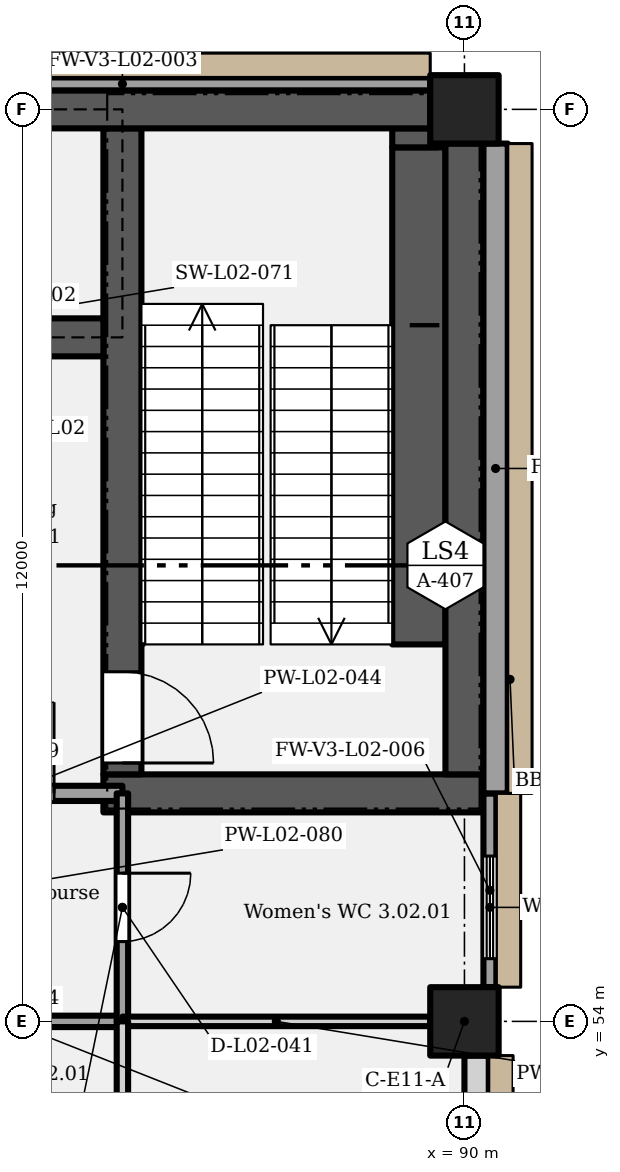
"""IFC4 building model, lengths in metres.
Left out: names, types, materials, properties, quantities, classifications, styles, units other than length and angle.
Written with IfcOpenShell. Run it as: python <this file> out.ifc"""

import sys

from ifc_helpers import new_model, si_unit, direction, frame, frame_2d, origin, origin_2d, place, context, subcontext, project, spatial, rectangle, extrude, element, fill, save


model = new_model("IFC4")
c1 = context("Model", 3, precision=1e-05, world=origin(), true_north=direction((0.0, 1.0)))
c2 = subcontext(c1, "Body", "Model", "MODEL_VIEW")
j1 = project(units=[si_unit("LENGTHUNIT", "METRE"), si_unit("PLANEANGLEUNIT", "RADIAN")], contexts=[c1])
p1 = place(None, origin())
s1 = spatial("IfcSite", under=j1, at=p1, CompositionType="ELEMENT")
p2 = place(p1, origin())
s2 = spatial("IfcBuilding", under=s1, at=p2, CompositionType="ELEMENT")
p3 = place(p2, frame((0.0, 0.0, 12.0)))
s3 = spatial("IfcBuildingStorey", under=s2, at=p3, CompositionType="ELEMENT", Elevation=12.0)
for number, where, z_axis, x_axis in (
    (1, (90.0, 54.0, 0.0), (0.0, 0.0, 1.0), (1.0, 0.0, 0.0)),
    (2, (90.0, 66.0, 0.0), (0.0, 0.0, 1.0), (1.0, 0.0, 0.0)),
):
    element("IfcColumn", number, at=place(p3, frame(where, z_axis=z_axis, x_axis=x_axis)), inside=s3, PredefinedType="COLUMN", context=c2, shape_type="SweptSolid", body=[
        extrude(rectangle(XDim=0.9, YDim=0.9, at=origin_2d()), origin(), (0.0, 0.0, 1.0), 5.4),
    ])
p4 = place(p3, frame((85.25, 57.0, 0.0), z_axis=(0.0, 0.0, 1.0), x_axis=(1.0, 0.0, 0.0)))
e3 = element("IfcWall", 3, at=p4, inside=s3, PredefinedType="SHEAR", context=c2, shape_type="SweptSolid", body=[
    extrude(rectangle(XDim=5.0, YDim=0.5, at=frame_2d((2.5, 0.0))), origin(), (0.0, 0.0, 1.0), 5.15),
])
p5 = place(p3, frame((85.5, 57.25, 0.0), z_axis=(0.0, 0.0, 1.0), x_axis=(0.0, 1.0, 0.0)))
e4 = element("IfcWall", 4, at=p5, inside=s3, PredefinedType="SHEAR", context=c2, shape_type="SweptSolid", body=[
    extrude(rectangle(XDim=8.5, YDim=0.5, at=frame_2d((4.25, 0.0))), origin(), (0.0, 0.0, 1.0), 5.15),
])
p6 = place(p5, frame((1.35, 0.0, 0.0), z_axis=(0.0, 0.0, 1.0), x_axis=(-1.0, 0.0, 0.0)))
e5 = element("IfcOpeningElement", 5, at=p6, cuts=e4, PredefinedType="OPENING", context=c2, shape_type="SweptSolid", body=[
    extrude(rectangle(XDim=1.2, YDim=2.1, at=frame_2d((0.6, 1.05))), frame((0.0, 0.26, 0.0), z_axis=(0.0, -1.0, 0.0), x_axis=(1.0, 0.0, 0.0)), (0.0, 0.0, 1.0), 0.52),
])
p7 = place(p3, frame((90.0, 57.25, 0.0), z_axis=(0.0, 0.0, 1.0), x_axis=(0.0, 1.0, 0.0)))
e6 = element("IfcWall", 6, at=p7, inside=s3, PredefinedType="SHEAR", context=c2, shape_type="SweptSolid", body=[
    extrude(rectangle(XDim=8.3, YDim=0.5, at=frame_2d((4.15, 0.0))), origin(), (0.0, 0.0, 1.0), 5.15),
])
p8 = place(p3, frame((79.25, 63.0, 0.0), z_axis=(0.0, 0.0, 1.0), x_axis=(1.0, 0.0, 0.0)))
e7 = element("IfcWall", 7, at=p8, inside=s3, PredefinedType="SHEAR", context=c2, shape_type="SweptSolid", body=[
    extrude(rectangle(XDim=6.0, YDim=0.5, at=frame_2d((3.0, 0.0))), origin(), (0.0, 0.0, 1.0), 5.15),
])
p9 = place(p8, frame((4.2, 0.0, 0.0)))
e8 = element("IfcOpeningElement", 8, at=p9, cuts=e7, PredefinedType="OPENING", context=c2, shape_type="SweptSolid", body=[
    extrude(rectangle(XDim=1.1, YDim=2.1, at=frame_2d((0.55, 1.05))), frame((0.0, 0.26, 0.0), z_axis=(0.0, -1.0, 0.0), x_axis=(1.0, 0.0, 0.0)), (0.0, 0.0, 1.0), 0.52),
])
p10 = place(p3, frame((82.25, 66.0, 0.0), z_axis=(0.0, 0.0, 1.0), x_axis=(1.0, 0.0, 0.0)))
e9 = element("IfcWall", 9, at=p10, inside=s3, PredefinedType="SHEAR", context=c2, shape_type="SweptSolid", body=[
    extrude(rectangle(XDim=7.3, YDim=0.5, at=frame_2d((3.65, 0.0))), origin(), (0.0, 0.0, 1.0), 5.15),
])
p11 = place(p3, frame((81.45, 66.335, 0.0), z_axis=(0.0, 0.0, 1.0), x_axis=(1.0, 0.0, 0.0)))
e10 = element("IfcWall", 10, at=p11, inside=s3, PredefinedType="SOLIDWALL", context=c2, shape_type="SweptSolid", body=[
    extrude(rectangle(XDim=8.1, YDim=0.17, at=frame_2d((4.05, 0.0))), origin(), (0.0, 0.0, 1.0), 5.15),
])
p12 = place(p3, frame((90.16, 49.5, 0.0), z_axis=(0.0, 0.0, 1.0), x_axis=(0.0, 1.0, 0.0)))
e11 = element("IfcWall", 11, at=p12, inside=s3, PredefinedType="SOLIDWALL", context=c2, shape_type="SweptSolid", body=[
    extrude(rectangle(XDim=4.05, YDim=0.32, at=frame_2d((2.025, 0.0))), origin(), (0.0, 0.0, 1.0), 5.15),
])
p13 = place(p12, frame((2.25, 0.0, 1.2)))
e12 = element("IfcOpeningElement", 12, at=p13, cuts=e11, PredefinedType="OPENING", context=c2, shape_type="SweptSolid", body=[
    extrude(rectangle(XDim=1.2, YDim=2.1, at=frame_2d((0.6, 1.05))), frame((0.0, 0.17, 0.0), z_axis=(0.0, -1.0, 0.0), x_axis=(1.0, 0.0, 0.0)), (0.0, 0.0, 1.0), 0.34),
])
p14 = place(p3, frame((90.335, 54.45, 0.0), z_axis=(0.0, 0.0, 1.0), x_axis=(0.0, 1.0, 0.0)))
e13 = element("IfcWall", 13, at=p14, inside=s3, PredefinedType="SOLIDWALL", context=c2, shape_type="SweptSolid", body=[
    extrude(rectangle(XDim=2.55, YDim=0.17, at=frame_2d((1.275, 0.0))), origin(), (0.0, 0.0, 1.0), 5.15),
])
p15 = place(p14, frame((0.375, 0.0, 1.2)))
e14 = element("IfcOpeningElement", 14, at=p15, cuts=e13, PredefinedType="OPENING", context=c2, shape_type="SweptSolid", body=[
    extrude(rectangle(XDim=1.35, YDim=2.55, at=frame_2d((0.675, 1.275))), frame((0.0, 0.095, 0.0), z_axis=(0.0, -1.0, 0.0), x_axis=(1.0, 0.0, 0.0)), (0.0, 0.0, 1.0), 0.19),
])
p16 = place(p3, frame((90.41, 57.0, 0.0), z_axis=(0.0, 0.0, 1.0), x_axis=(0.0, 1.0, 0.0)))
e15 = element("IfcWall", 15, at=p16, inside=s3, PredefinedType="SOLIDWALL", context=c2, shape_type="SweptSolid", body=[
    extrude(rectangle(XDim=8.55, YDim=0.32, at=frame_2d((4.275, 0.0))), origin(), (0.0, 0.0, 1.0), 5.15),
])
p17 = place(p3, frame((82.5, 54.0, 0.0), z_axis=(0.0, 0.0, 1.0), x_axis=(1.0, 0.0, 0.0)))
e16 = element("IfcWall", 16, at=p17, inside=s3, PredefinedType="PARTITIONING", context=c2, shape_type="SweptSolid", body=[
    extrude(rectangle(XDim=3.0, YDim=0.15, at=frame_2d((1.5, 0.0))), origin(), (0.0, 0.0, 1.0), 4.4),
])
p18 = place(p17, frame((2.0, 0.0, 0.0), z_axis=(0.0, 0.0, 1.0), x_axis=(-1.0, 0.0, 0.0)))
e17 = element("IfcOpeningElement", 17, at=p18, cuts=e16, PredefinedType="OPENING", context=c2, shape_type="SweptSolid", body=[
    extrude(rectangle(XDim=1.0, YDim=2.1, at=frame_2d((0.5, 1.05))), frame((0.0, 0.085, 0.0), z_axis=(0.0, -1.0, 0.0), x_axis=(1.0, 0.0, 0.0)), (0.0, 0.0, 1.0), 0.17),
])
p19 = place(p3, frame((85.5, 54.0, 0.0), z_axis=(0.0, 0.0, 1.0), x_axis=(1.0, 0.0, 0.0)))
e18 = element("IfcWall", 18, at=p19, inside=s3, PredefinedType="PARTITIONING", context=c2, shape_type="SweptSolid", body=[
    extrude(rectangle(XDim=4.05, YDim=0.125, at=frame_2d((2.025, 0.0))), origin(), (0.0, 0.0, 1.0), 4.4),
])
p20 = place(p3, frame((82.5, 57.0, 0.0), z_axis=(0.0, 0.0, 1.0), x_axis=(1.0, 0.0, 0.0)))
e19 = element("IfcWall", 19, at=p20, inside=s3, PredefinedType="PARTITIONING", context=c2, shape_type="SweptSolid", body=[
    extrude(rectangle(XDim=3.0, YDim=0.2, at=frame_2d((1.5, 0.0))), origin(), (0.0, 0.0, 1.0), 5.15),
])
p21 = place(p20, frame((0.9, 0.0, 0.0)))
e20 = element("IfcOpeningElement", 20, at=p21, cuts=e19, PredefinedType="OPENING", context=c2, shape_type="SweptSolid", body=[
    extrude(rectangle(XDim=1.2, YDim=2.1, at=frame_2d((0.6, 1.05))), frame((0.0, 0.11, 0.0), z_axis=(0.0, -1.0, 0.0), x_axis=(1.0, 0.0, 0.0)), (0.0, 0.0, 1.0), 0.22),
])
p22 = place(p3, frame((85.5, 49.575, 0.0), z_axis=(0.0, 0.0, 1.0), x_axis=(0.0, 1.0, 0.0)))
e21 = element("IfcWall", 21, at=p22, inside=s3, PredefinedType="PARTITIONING", context=c2, shape_type="SweptSolid", body=[
    extrude(rectangle(XDim=4.425, YDim=0.15, at=frame_2d((2.212, 0.0))), origin(), (0.0, 0.0, 1.0), 5.15),
])
p23 = place(p22, frame((2.625, 0.0, 0.0), z_axis=(0.0, 0.0, 1.0), x_axis=(-1.0, 0.0, 0.0)))
e22 = element("IfcOpeningElement", 22, at=p23, cuts=e21, PredefinedType="OPENING", context=c2, shape_type="SweptSolid", body=[
    extrude(rectangle(XDim=0.9, YDim=2.1, at=frame_2d((0.45, 1.05))), frame((0.0, 0.085, 0.0), z_axis=(0.0, -1.0, 0.0), x_axis=(1.0, 0.0, 0.0)), (0.0, 0.0, 1.0), 0.17),
])
p24 = place(p3, frame((85.5, 54.0, 0.0), z_axis=(0.0, 0.0, 1.0), x_axis=(0.0, 1.0, 0.0)))
e23 = element("IfcWall", 23, at=p24, inside=s3, PredefinedType="PARTITIONING", context=c2, shape_type="SweptSolid", body=[
    extrude(rectangle(XDim=3.0, YDim=0.15, at=frame_2d((1.5, 0.0))), origin(), (0.0, 0.0, 1.0), 5.15),
])
p25 = place(p24, frame((1.95, 0.0, 0.0), z_axis=(0.0, 0.0, 1.0), x_axis=(-1.0, 0.0, 0.0)))
e24 = element("IfcOpeningElement", 24, at=p25, cuts=e23, PredefinedType="OPENING", context=c2, shape_type="SweptSolid", body=[
    extrude(rectangle(XDim=0.9, YDim=2.1, at=frame_2d((0.45, 1.05))), frame((0.0, 0.085, 0.0), z_axis=(0.0, -1.0, 0.0), x_axis=(1.0, 0.0, 0.0)), (0.0, 0.0, 1.0), 0.17),
])
p26 = place(p3, frame((89.4, 58.96, 0.0), z_axis=(0.0, 0.0, 1.0), x_axis=(0.0, 1.0, 0.0)))
e25 = element("IfcWall", 25, at=p26, inside=s3, PredefinedType="SHEAR", context=c2, shape_type="SweptSolid", body=[
    extrude(rectangle(XDim=6.54, YDim=0.7, at=frame_2d((3.27, 0.0))), origin(), (0.0, 0.0, 1.0), 2.587),
])
p27 = place(p3, frame((89.35, 65.5, 0.0), z_axis=(0.0, 0.0, 1.0), x_axis=(0.0, 1.0, 0.0)))
e26 = element("IfcWall", 26, at=p27, inside=s3, PredefinedType="SHEAR", context=c2, shape_type="SweptSolid", body=[
    extrude(rectangle(XDim=0.25, YDim=0.6, at=frame_2d((0.125, 0.0))), origin(), (0.0, 0.0, 1.0), 2.587),
])
p28 = place(p15, origin())
e27 = element("IfcWindow", 27, at=p28, inside=s3, PartitioningType="SINGLE_PANEL", PredefinedType="WINDOW", context=c2, shape_type="SweptSolid", body=[
    extrude(rectangle(XDim=1.35, YDim=2.55, at=frame_2d((0.675, 1.275))), frame((0.0, 0.03, 0.0), z_axis=(0.0, -1.0, 0.0), x_axis=(1.0, 0.0, 0.0)), (0.0, 0.0, 1.0), 0.06),
])
fill(e14, e27)
p29 = place(p6, origin())
e28 = element("IfcDoor", 28, at=p29, inside=s3, OperationType="SINGLE_SWING_RIGHT", PredefinedType="DOOR", context=c2, shape_type="SweptSolid", body=[
    extrude(rectangle(XDim=1.2, YDim=2.1, at=frame_2d((0.6, 1.05))), frame((0.0, 0.025, 0.0), z_axis=(0.0, -1.0, 0.0), x_axis=(1.0, 0.0, 0.0)), (0.0, 0.0, 1.0), 0.05),
])
fill(e5, e28)
p30 = place(p21, origin())
e29 = element("IfcDoor", 29, at=p30, inside=s3, OperationType="SINGLE_SWING_RIGHT", PredefinedType="DOOR", context=c2, shape_type="SweptSolid", body=[
    extrude(rectangle(XDim=1.2, YDim=2.1, at=frame_2d((0.6, 1.05))), frame((0.0, 0.025, 0.0), z_axis=(0.0, -1.0, 0.0), x_axis=(1.0, 0.0, 0.0)), (0.0, 0.0, 1.0), 0.05),
])
fill(e20, e29)
p31 = place(p25, origin())
e30 = element("IfcDoor", 30, at=p31, inside=s3, OperationType="SINGLE_SWING_LEFT", PredefinedType="DOOR", context=c2, shape_type="SweptSolid", body=[
    extrude(rectangle(XDim=0.9, YDim=2.1, at=frame_2d((0.45, 1.05))), frame((0.0, 0.025, 0.0), z_axis=(0.0, -1.0, 0.0), x_axis=(1.0, 0.0, 0.0)), (0.0, 0.0, 1.0), 0.05),
])
fill(e24, e30)
save(model, sys.argv[1])
